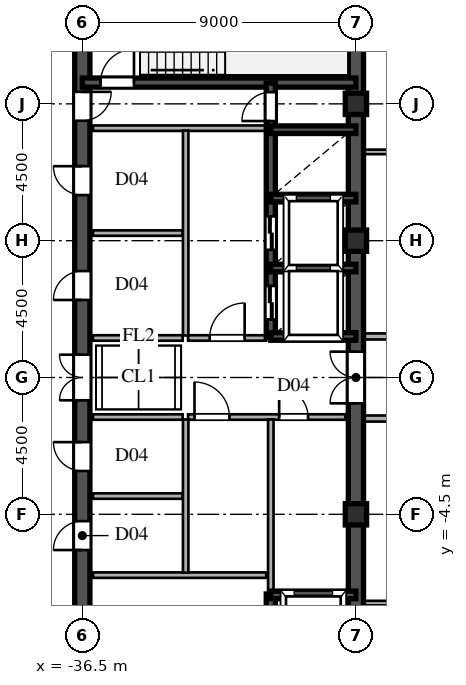
"""IFC4 building model, lengths in metres.
Left out: names, types, materials, properties, quantities, classifications, styles, units other than length and angle.
Written with IfcOpenShell. Run it as: python <this file> out.ifc"""

import sys

from ifc_helpers import new_model, si_unit, direction, frame, frame_2d, origin, origin_2d, place, context, subcontext, project, spatial, rectangle, hollow_rectangle, extrude, source, transform, mapped, element, fill, save


model = new_model("IFC4")
c1 = context("Model", 3, precision=1e-05, world=origin(), true_north=direction((0.0, 1.0)))
c2 = subcontext(c1, "Body", "Model", "MODEL_VIEW")
j1 = project(units=[si_unit("LENGTHUNIT", "METRE"), si_unit("PLANEANGLEUNIT", "RADIAN")], contexts=[c1])
p1 = place(None, origin())
s1 = spatial("IfcSite", under=j1, at=p1, CompositionType="ELEMENT")
p2 = place(p1, origin())
s2 = spatial("IfcBuilding", under=s1, at=p2, CompositionType="ELEMENT")
p3 = place(p2, frame((0.0, 0.0, 239.4)))
s3 = spatial("IfcBuildingStorey", under=s2, at=p3, CompositionType="ELEMENT", Elevation=239.4)
m1 = source(origin(), c2, "Body", "SweptSolid", [
    extrude(hollow_rectangle(XDim=0.7, YDim=0.7, WallThickness=0.03, at=origin_2d()), origin(), (0.0, 0.0, 1.0), 3.75),
])
for number, where, z_axis, x_axis in (
    (1, (-27.5, -4.5, 0.0), (0.0, 0.0, 1.0), (1.0, 0.0, 0.0)),
    (2, (-27.5, 4.5, 0.0), (0.0, 0.0, 1.0), (1.0, 0.0, 0.0)),
    (3, (-27.5, 9.0, 0.0), (0.0, 0.0, 1.0), (1.0, 0.0, 0.0)),
):
    element("IfcColumn", number, at=place(p3, frame(where, z_axis=z_axis, x_axis=x_axis)), inside=s3, PredefinedType="COLUMN", context=c2, shape_type="MappedRepresentation", body=[
        mapped(m1, transform((0.0, 0.0, 0.0), scale=1.0)),
    ])
for number, where, z_axis, x_axis in (
    (4, (-27.5, -13.5, 0.0), (0.0, 0.0, 1.0), (0.0, 1.0, 0.0)),
    (5, (-27.5, 1.3, 0.0), (0.0, 0.0, 1.0), (0.0, 1.0, 0.0)),
):
    element("IfcWall", number, at=place(p3, frame(where, z_axis=z_axis, x_axis=x_axis)), inside=s3, PredefinedType="SHEAR", context=c2, shape_type="SweptSolid", body=[
        extrude(rectangle(XDim=12.2, YDim=0.5, at=frame_2d((6.1, 0.0))), origin(), (0.0, 0.0, 1.0), 3.53),
    ])
p4 = place(p3, frame((-27.5, -1.3, 0.0), z_axis=(0.0, 0.0, 1.0), x_axis=(0.0, 1.0, 0.0)))
e6 = element("IfcWall", 6, at=p4, inside=s3, PredefinedType="SHEAR", context=c2, shape_type="SweptSolid", body=[
    extrude(rectangle(XDim=2.6, YDim=0.5, at=frame_2d((1.3, 0.0))), origin(), (0.0, 0.0, 1.0), 3.53),
])
p5 = place(p4, frame((0.45, 0.0, 0.0)))
e7 = element("IfcOpeningElement", 7, at=p5, cuts=e6, PredefinedType="OPENING", context=c2, shape_type="SweptSolid", body=[
    extrude(rectangle(XDim=1.7, YDim=2.35, at=frame_2d((0.85, 1.175))), frame((0.0, 0.26, 0.0), z_axis=(0.0, -1.0, 0.0), x_axis=(1.0, 0.0, 0.0)), (0.0, 0.0, 1.0), 0.52),
])
p6 = place(p3, frame((-36.5, -13.65, 0.0), z_axis=(0.0, 0.0, 1.0), x_axis=(0.0, 1.0, 0.0)))
e8 = element("IfcWall", 8, at=p6, inside=s3, PredefinedType="SHEAR", context=c2, shape_type="SweptSolid", body=[
    extrude(rectangle(XDim=7.15, YDim=0.5, at=frame_2d((3.575, 0.0))), origin(), (0.0, 0.0, 1.0), 3.53),
])
p7 = place(p6, frame((4.675, 0.0, 0.0)))
e9 = element("IfcOpeningElement", 9, at=p7, cuts=e8, PredefinedType="OPENING", context=c2, shape_type="SweptSolid", body=[
    extrude(rectangle(XDim=1.15, YDim=2.2, at=frame_2d((0.575, 1.1))), frame((0.0, 0.26, 0.0), z_axis=(0.0, -1.0, 0.0), x_axis=(1.0, 0.0, 0.0)), (0.0, 0.0, 1.0), 0.52),
])
p8 = place(p3, frame((-36.5, -1.3, 0.0), z_axis=(0.0, 0.0, 1.0), x_axis=(0.0, 1.0, 0.0)))
e10 = element("IfcWall", 10, at=p8, inside=s3, PredefinedType="SHEAR", context=c2, shape_type="SweptSolid", body=[
    extrude(rectangle(XDim=2.6, YDim=0.5, at=frame_2d((1.3, 0.0))), origin(), (0.0, 0.0, 1.0), 3.53),
])
p9 = place(p8, frame((0.55, 0.0, 0.0)))
e11 = element("IfcOpeningElement", 11, at=p9, cuts=e10, PredefinedType="OPENING", context=c2, shape_type="SweptSolid", body=[
    extrude(rectangle(XDim=1.5, YDim=2.3, at=frame_2d((0.75, 1.15))), frame((0.0, 0.26, 0.0), z_axis=(0.0, -1.0, 0.0), x_axis=(1.0, 0.0, 0.0)), (0.0, 0.0, 1.0), 0.52),
])
p10 = place(p3, frame((-36.5, 8.2, 0.0), z_axis=(0.0, 0.0, 1.0), x_axis=(0.0, 1.0, 0.0)))
e12 = element("IfcWall", 12, at=p10, inside=s3, PredefinedType="SHEAR", context=c2, shape_type="SweptSolid", body=[
    extrude(rectangle(XDim=5.45, YDim=0.5, at=frame_2d((2.725, 0.0))), origin(), (0.0, 0.0, 1.0), 3.53),
])
p11 = place(p10, frame((0.245, 0.0, 0.0)))
e13 = element("IfcOpeningElement", 13, at=p11, cuts=e12, PredefinedType="OPENING", context=c2, shape_type="SweptSolid", body=[
    extrude(rectangle(XDim=0.95, YDim=2.15, at=frame_2d((0.475, 1.075))), frame((0.0, 0.26, 0.0), z_axis=(0.0, -1.0, 0.0), x_axis=(1.0, 0.0, 0.0)), (0.0, 0.0, 1.0), 0.52),
])
p12 = place(p3, frame((-36.5, -6.5, 0.0), z_axis=(0.0, 0.0, 1.0), x_axis=(0.0, 1.0, 0.0)))
e14 = element("IfcWall", 14, at=p12, inside=s3, PredefinedType="SHEAR", context=c2, shape_type="SweptSolid", body=[
    extrude(rectangle(XDim=2.6, YDim=0.5, at=frame_2d((1.3, 0.0))), origin(), (0.0, 0.0, 1.0), 3.53),
])
p13 = place(p12, frame((0.825, 0.0, 0.0)))
e15 = element("IfcOpeningElement", 15, at=p13, cuts=e14, PredefinedType="OPENING", context=c2, shape_type="SweptSolid", body=[
    extrude(rectangle(XDim=0.95, YDim=2.15, at=frame_2d((0.475, 1.075))), frame((0.0, 0.26, 0.0), z_axis=(0.0, -1.0, 0.0), x_axis=(1.0, 0.0, 0.0)), (0.0, 0.0, 1.0), 0.52),
])
p14 = place(p3, frame((-36.5, -3.9, 0.0), z_axis=(0.0, 0.0, 1.0), x_axis=(0.0, 1.0, 0.0)))
e16 = element("IfcWall", 16, at=p14, inside=s3, PredefinedType="SHEAR", context=c2, shape_type="SweptSolid", body=[
    extrude(rectangle(XDim=2.6, YDim=0.5, at=frame_2d((1.3, 0.0))), origin(), (0.0, 0.0, 1.0), 3.53),
])
p15 = place(p14, frame((0.825, 0.0, 0.0)))
e17 = element("IfcOpeningElement", 17, at=p15, cuts=e16, PredefinedType="OPENING", context=c2, shape_type="SweptSolid", body=[
    extrude(rectangle(XDim=0.95, YDim=2.15, at=frame_2d((0.475, 1.075))), frame((0.0, 0.26, 0.0), z_axis=(0.0, -1.0, 0.0), x_axis=(1.0, 0.0, 0.0)), (0.0, 0.0, 1.0), 0.52),
])
p16 = place(p3, frame((-36.5, 1.3, 0.0), z_axis=(0.0, 0.0, 1.0), x_axis=(0.0, 1.0, 0.0)))
e18 = element("IfcWall", 18, at=p16, inside=s3, PredefinedType="SHEAR", context=c2, shape_type="SweptSolid", body=[
    extrude(rectangle(XDim=3.45, YDim=0.5, at=frame_2d((1.725, 0.0))), origin(), (0.0, 0.0, 1.0), 3.53),
])
p17 = place(p16, frame((1.25, 0.0, 0.0)))
e19 = element("IfcOpeningElement", 19, at=p17, cuts=e18, PredefinedType="OPENING", context=c2, shape_type="SweptSolid", body=[
    extrude(rectangle(XDim=0.95, YDim=2.15, at=frame_2d((0.475, 1.075))), frame((0.0, 0.26, 0.0), z_axis=(0.0, -1.0, 0.0), x_axis=(1.0, 0.0, 0.0)), (0.0, 0.0, 1.0), 0.52),
])
p18 = place(p3, frame((-36.5, 4.75, 0.0), z_axis=(0.0, 0.0, 1.0), x_axis=(0.0, 1.0, 0.0)))
e20 = element("IfcWall", 20, at=p18, inside=s3, PredefinedType="SHEAR", context=c2, shape_type="SweptSolid", body=[
    extrude(rectangle(XDim=3.45, YDim=0.5, at=frame_2d((1.725, 0.0))), origin(), (0.0, 0.0, 1.0), 3.53),
])
p19 = place(p18, frame((1.25, 0.0, 0.0)))
e21 = element("IfcOpeningElement", 21, at=p19, cuts=e20, PredefinedType="OPENING", context=c2, shape_type="SweptSolid", body=[
    extrude(rectangle(XDim=0.95, YDim=2.15, at=frame_2d((0.475, 1.075))), frame((0.0, 0.26, 0.0), z_axis=(0.0, -1.0, 0.0), x_axis=(1.0, 0.0, 0.0)), (0.0, 0.0, 1.0), 0.52),
])
p20 = place(p3, frame((-36.5, 9.7, 0.0), z_axis=(0.0, 0.0, 1.0), x_axis=(1.0, 0.0, 0.0)))
e22 = element("IfcWall", 22, at=p20, inside=s3, PredefinedType="SHEAR", context=c2, shape_type="SweptSolid", body=[
    extrude(rectangle(XDim=9.0, YDim=0.3, at=frame_2d((4.5, 0.0))), origin(), (0.0, 0.0, 1.0), 3.53),
])
p21 = place(p20, frame((0.6, 0.0, 0.0)))
e23 = element("IfcOpeningElement", 23, at=p21, cuts=e22, PredefinedType="OPENING", context=c2, shape_type="SweptSolid", body=[
    extrude(rectangle(XDim=1.1, YDim=2.2, at=frame_2d((0.55, 1.1))), frame((0.0, 0.16, 0.0), z_axis=(0.0, -1.0, 0.0), x_axis=(1.0, 0.0, 0.0)), (0.0, 0.0, 1.0), 0.32),
])
for number, where, z_axis, x_axis in (
    (24, (-30.3, -7.15, 0.0), (0.0, 0.0, 1.0), (1.0, 0.0, 0.0)),
    (25, (-30.3, 1.35, 0.0), (0.0, 0.0, 1.0), (1.0, 0.0, 0.0)),
    (26, (-30.3, 3.6, 0.0), (0.0, 0.0, 1.0), (1.0, 0.0, 0.0)),
    (27, (-30.3, 5.9, 0.0), (0.0, 0.0, 1.0), (1.0, 0.0, 0.0)),
    (28, (-30.3, 8.15, 0.0), (0.0, 0.0, 1.0), (1.0, 0.0, 0.0)),
):
    element("IfcWall", number, at=place(p3, frame(where, z_axis=z_axis, x_axis=x_axis)), inside=s3, PredefinedType="SHEAR", context=c2, shape_type="SweptSolid", body=[
        extrude(rectangle(XDim=2.8, YDim=0.25, at=frame_2d((1.4, 0.0))), origin(), (0.0, 0.0, 1.0), 3.53),
    ])
p22 = place(p3, frame((-30.3, -9.68, 0.0), z_axis=(0.0, 0.0, 1.0), x_axis=(0.0, 1.0, 0.0)))
e29 = element("IfcWall", 29, at=p22, inside=s3, PredefinedType="SHEAR", context=c2, shape_type="SweptSolid", body=[
    extrude(rectangle(XDim=2.56, YDim=0.3, at=frame_2d((1.28, 0.0))), origin(), (0.0, 0.0, 1.0), 3.53),
])
p23 = place(p22, frame((0.68, 0.0, 0.0)))
e30 = element("IfcOpeningElement", 30, at=p23, cuts=e29, PredefinedType="OPENING", context=c2, shape_type="SweptSolid", body=[
    extrude(rectangle(XDim=1.2, YDim=2.25, at=frame_2d((0.6, 1.125))), frame((0.0, 0.16, 0.0), z_axis=(0.0, -1.0, 0.0), x_axis=(1.0, 0.0, 0.0)), (0.0, 0.0, 1.0), 0.32),
])
p24 = place(p3, frame((-30.3, 1.32, 0.0), z_axis=(0.0, 0.0, 1.0), x_axis=(0.0, 1.0, 0.0)))
e31 = element("IfcWall", 31, at=p24, inside=s3, PredefinedType="SHEAR", context=c2, shape_type="SweptSolid", body=[
    extrude(rectangle(XDim=2.28, YDim=0.3, at=frame_2d((1.14, 0.0))), origin(), (0.0, 0.0, 1.0), 3.53),
])
p25 = place(p24, frame((0.59, 0.0, 0.0)))
e32 = element("IfcOpeningElement", 32, at=p25, cuts=e31, PredefinedType="OPENING", context=c2, shape_type="SweptSolid", body=[
    extrude(rectangle(XDim=1.1, YDim=2.2, at=frame_2d((0.55, 1.1))), frame((0.0, 0.16, 0.0), z_axis=(0.0, -1.0, 0.0), x_axis=(1.0, 0.0, 0.0)), (0.0, 0.0, 1.0), 0.32),
])
p26 = place(p3, frame((-30.3, 3.6, 0.0), z_axis=(0.0, 0.0, 1.0), x_axis=(0.0, 1.0, 0.0)))
e33 = element("IfcWall", 33, at=p26, inside=s3, PredefinedType="SHEAR", context=c2, shape_type="SweptSolid", body=[
    extrude(rectangle(XDim=2.3, YDim=0.3, at=frame_2d((1.15, 0.0))), origin(), (0.0, 0.0, 1.0), 3.53),
])
p27 = place(p26, frame((0.6, 0.0, 0.0)))
e34 = element("IfcOpeningElement", 34, at=p27, cuts=e33, PredefinedType="OPENING", context=c2, shape_type="SweptSolid", body=[
    extrude(rectangle(XDim=1.1, YDim=2.2, at=frame_2d((0.55, 1.1))), frame((0.0, 0.16, 0.0), z_axis=(0.0, -1.0, 0.0), x_axis=(1.0, 0.0, 0.0)), (0.0, 0.0, 1.0), 0.32),
])
p28 = place(p3, frame((-30.3, 5.9, 0.0), z_axis=(0.0, 0.0, 1.0), x_axis=(0.0, 1.0, 0.0)))
e35 = element("IfcWall", 35, at=p28, inside=s3, PredefinedType="SHEAR", context=c2, shape_type="SweptSolid", body=[
    extrude(rectangle(XDim=2.25, YDim=0.3, at=frame_2d((1.125, 0.0))), origin(), (0.0, 0.0, 1.0), 3.53),
])
p29 = place(p3, frame((-30.3, 8.15, 0.0), z_axis=(0.0, 0.0, 1.0), x_axis=(0.0, 1.0, 0.0)))
e36 = element("IfcWall", 36, at=p29, inside=s3, PredefinedType="SHEAR", context=c2, shape_type="SweptSolid", body=[
    extrude(rectangle(XDim=1.53, YDim=0.3, at=frame_2d((0.765, 0.0))), origin(), (0.0, 0.0, 1.0), 3.53),
])
p30 = place(p29, frame((0.285, 0.0, 0.0)))
e37 = element("IfcOpeningElement", 37, at=p30, cuts=e36, PredefinedType="OPENING", context=c2, shape_type="SweptSolid", body=[
    extrude(rectangle(XDim=0.95, YDim=2.15, at=frame_2d((0.475, 1.075))), frame((0.0, 0.16, 0.0), z_axis=(0.0, -1.0, 0.0), x_axis=(1.0, 0.0, 0.0)), (0.0, 0.0, 1.0), 0.32),
])
for number, where, z_axis, x_axis in (
    (38, (-36.15, -6.5, 0.0), (0.0, 0.0, 1.0), (1.0, 0.0, 0.0)),
    (39, (-36.15, 8.2, 0.0), (0.0, 0.0, 1.0), (1.0, 0.0, 0.0)),
):
    element("IfcWall", number, at=place(p3, frame(where, z_axis=z_axis, x_axis=x_axis)), inside=s3, PredefinedType="PARTITIONING", context=c2, shape_type="SweptSolid", body=[
        extrude(rectangle(XDim=5.7, YDim=0.18, at=frame_2d((2.85, 0.0))), origin(), (0.0, 0.0, 1.0), 3.53),
    ])
p31 = place(p3, frame((-33.1, -6.42, 0.0), z_axis=(0.0, 0.0, 1.0), x_axis=(0.0, 1.0, 0.0)))
e40 = element("IfcWall", 40, at=p31, inside=s3, PredefinedType="PARTITIONING", context=c2, shape_type="SweptSolid", body=[
    extrude(rectangle(XDim=5.04, YDim=0.18, at=frame_2d((2.52, 0.0))), origin(), (0.0, 0.0, 1.0), 3.53),
])
p32 = place(p3, frame((-33.1, 1.38, 0.0), z_axis=(0.0, 0.0, 1.0), x_axis=(0.0, 1.0, 0.0)))
e41 = element("IfcWall", 41, at=p32, inside=s3, PredefinedType="PARTITIONING", context=c2, shape_type="SweptSolid", body=[
    extrude(rectangle(XDim=6.74, YDim=0.18, at=frame_2d((3.37, 0.0))), origin(), (0.0, 0.0, 1.0), 3.53),
])
p33 = place(p3, frame((-30.3, -1.3, 0.0), z_axis=(0.0, 0.0, 1.0), x_axis=(1.0, 0.0, 0.0)))
e42 = element("IfcWall", 42, at=p33, inside=s3, PredefinedType="PARTITIONING", context=c2, shape_type="SweptSolid", body=[
    extrude(rectangle(XDim=2.45, YDim=0.18, at=frame_2d((1.225, 0.0))), origin(), (0.0, 0.0, 1.0), 3.53),
])
p34 = place(p33, frame((0.275, 0.0, 0.0)))
e43 = element("IfcOpeningElement", 43, at=p34, cuts=e42, PredefinedType="OPENING", context=c2, shape_type="SweptSolid", body=[
    extrude(rectangle(XDim=0.95, YDim=2.15, at=frame_2d((0.475, 1.075))), frame((0.0, 0.1, 0.0), z_axis=(0.0, -1.0, 0.0), x_axis=(1.0, 0.0, 0.0)), (0.0, 0.0, 1.0), 0.2),
])
p35 = place(p3, frame((-33.02, -1.3, 0.0), z_axis=(0.0, 0.0, 1.0), x_axis=(1.0, 0.0, 0.0)))
e44 = element("IfcWall", 44, at=p35, inside=s3, PredefinedType="PARTITIONING", context=c2, shape_type="SweptSolid", body=[
    extrude(rectangle(XDim=2.72, YDim=0.18, at=frame_2d((1.36, 0.0))), origin(), (0.0, 0.0, 1.0), 3.53),
])
p36 = place(p35, frame((0.21, 0.0, 0.0)))
e45 = element("IfcOpeningElement", 45, at=p36, cuts=e44, PredefinedType="OPENING", context=c2, shape_type="SweptSolid", body=[
    extrude(rectangle(XDim=1.15, YDim=2.2, at=frame_2d((0.575, 1.1))), frame((0.0, 0.1, 0.0), z_axis=(0.0, -1.0, 0.0), x_axis=(1.0, 0.0, 0.0)), (0.0, 0.0, 1.0), 0.2),
])
p37 = place(p3, frame((-30.3, -7.12, 0.0), z_axis=(0.0, 0.0, 1.0), x_axis=(0.0, 1.0, 0.0)))
e46 = element("IfcWall", 46, at=p37, inside=s3, PredefinedType="PARTITIONING", context=c2, shape_type="SweptSolid", body=[
    extrude(rectangle(XDim=5.74, YDim=0.18, at=frame_2d((2.87, 0.0))), origin(), (0.0, 0.0, 1.0), 3.53),
])
p38 = place(p3, frame((-33.02, 1.3, 0.0), z_axis=(0.0, 0.0, 1.0), x_axis=(1.0, 0.0, 0.0)))
e47 = element("IfcWall", 47, at=p38, inside=s3, PredefinedType="PARTITIONING", context=c2, shape_type="SweptSolid", body=[
    extrude(rectangle(XDim=2.57, YDim=0.18, at=frame_2d((1.285, 0.0))), origin(), (0.0, 0.0, 1.0), 3.53),
])
p39 = place(p38, frame((0.71, 0.0, 0.0)))
e48 = element("IfcOpeningElement", 48, at=p39, cuts=e47, PredefinedType="OPENING", context=c2, shape_type="SweptSolid", body=[
    extrude(rectangle(XDim=1.15, YDim=2.2, at=frame_2d((0.575, 1.1))), frame((0.0, 0.1, 0.0), z_axis=(0.0, -1.0, 0.0), x_axis=(1.0, 0.0, 0.0)), (0.0, 0.0, 1.0), 0.2),
])
for number, where, z_axis, x_axis in (
    (49, (-36.15, -1.3, 0.0), (0.0, 0.0, 1.0), (1.0, 0.0, 0.0)),
    (50, (-36.15, 1.3, 0.0), (0.0, 0.0, 1.0), (1.0, 0.0, 0.0)),
    (51, (-36.15, -3.9, 0.0), (0.0, 0.0, 1.0), (1.0, 0.0, 0.0)),
    (52, (-36.15, 4.75, 0.0), (0.0, 0.0, 1.0), (1.0, 0.0, 0.0)),
):
    element("IfcWall", number, at=place(p3, frame(where, z_axis=z_axis, x_axis=x_axis)), inside=s3, PredefinedType="PARTITIONING", context=c2, shape_type="SweptSolid", body=[
        extrude(rectangle(XDim=2.95, YDim=0.18, at=frame_2d((1.475, 0.0))), origin(), (0.0, 0.0, 1.0), 3.53),
    ])
p40 = place(p3, frame((-27.245, -7.42, 0.0), z_axis=(0.0, 0.0, 1.0), x_axis=(1.0, 0.0, 0.0)))
e53 = element("IfcWall", 53, at=p40, inside=s3, PredefinedType="PARTITIONING", context=c2, shape_type="SweptSolid", body=[
    extrude(rectangle(XDim=6.66, YDim=0.15, at=frame_2d((3.33, 0.0))), origin(), (0.0, 0.0, 1.0), 3.53),
])
p41 = place(p40, frame((3.07, 0.0, 0.0)))
e54 = element("IfcOpeningElement", 54, at=p41, cuts=e53, PredefinedType="OPENING", context=c2, shape_type="SweptSolid", body=[
    extrude(rectangle(XDim=0.95, YDim=2.15, at=frame_2d((0.475, 1.075))), frame((0.0, 0.085, 0.0), z_axis=(0.0, -1.0, 0.0), x_axis=(1.0, 0.0, 0.0)), (0.0, 0.0, 1.0), 0.17),
])
p42 = place(p3, frame((-27.245, -1.35, 0.0), z_axis=(0.0, 0.0, 1.0), x_axis=(1.0, 0.0, 0.0)))
e55 = element("IfcWall", 55, at=p42, inside=s3, PredefinedType="PARTITIONING", context=c2, shape_type="SweptSolid", body=[
    extrude(rectangle(XDim=54.49, YDim=0.2, at=frame_2d((27.245, 0.0))), origin(), (0.0, 0.0, 1.0), 3.53),
])
p43 = place(p42, frame((23.47, 0.0, 0.0)))
e56 = element("IfcOpeningElement", 56, at=p43, cuts=e55, PredefinedType="OPENING", context=c2, shape_type="SweptSolid", body=[
    extrude(rectangle(XDim=1.05, YDim=2.25, at=frame_2d((0.525, 1.125))), frame((0.0, 0.11, 0.0), z_axis=(0.0, -1.0, 0.0), x_axis=(1.0, 0.0, 0.0)), (0.0, 0.0, 1.0), 0.22),
])
p44 = place(p3, frame((-27.245, 1.35, 0.0), z_axis=(0.0, 0.0, 1.0), x_axis=(1.0, 0.0, 0.0)))
e57 = element("IfcWall", 57, at=p44, inside=s3, PredefinedType="PARTITIONING", context=c2, shape_type="SweptSolid", body=[
    extrude(rectangle(XDim=54.49, YDim=0.2, at=frame_2d((27.245, 0.0))), origin(), (0.0, 0.0, 1.0), 3.53),
])
p45 = place(p44, frame((23.47, 0.0, 0.0)))
e58 = element("IfcOpeningElement", 58, at=p45, cuts=e57, PredefinedType="OPENING", context=c2, shape_type="SweptSolid", body=[
    extrude(rectangle(XDim=1.05, YDim=2.25, at=frame_2d((0.525, 1.125))), frame((0.0, 0.11, 0.0), z_axis=(0.0, -1.0, 0.0), x_axis=(1.0, 0.0, 0.0)), (0.0, 0.0, 1.0), 0.22),
])
p46 = place(p3, frame((-27.245, 7.42, 0.0), z_axis=(0.0, 0.0, 1.0), x_axis=(1.0, 0.0, 0.0)))
e59 = element("IfcWall", 59, at=p46, inside=s3, PredefinedType="PARTITIONING", context=c2, shape_type="SweptSolid", body=[
    extrude(rectangle(XDim=6.66, YDim=0.15, at=frame_2d((3.33, 0.0))), origin(), (0.0, 0.0, 1.0), 3.53),
])
p47 = place(p46, frame((3.07, 0.0, 0.0)))
e60 = element("IfcOpeningElement", 60, at=p47, cuts=e59, PredefinedType="OPENING", context=c2, shape_type="SweptSolid", body=[
    extrude(rectangle(XDim=0.95, YDim=2.15, at=frame_2d((0.475, 1.075))), frame((0.0, 0.085, 0.0), z_axis=(0.0, -1.0, 0.0), x_axis=(1.0, 0.0, 0.0)), (0.0, 0.0, 1.0), 0.17),
])
m2 = source(origin(), c2, "Body", "SweptSolid", [
    extrude(rectangle(XDim=1.7, YDim=2.35, at=frame_2d((0.85, 1.175))), frame((0.0, 0.025, 0.0), z_axis=(0.0, -1.0, 0.0), x_axis=(1.0, 0.0, 0.0)), (0.0, 0.0, 1.0), 0.05),
])
p48 = place(p5, origin())
e61 = element("IfcDoor", 61, at=p48, inside=s3, OperationType="DOUBLE_SWING_LEFT", PredefinedType="DOOR", context=c2, shape_type="MappedRepresentation", body=[
    mapped(m2, transform((0.0, 0.0, 0.0), scale=1.0)),
])
fill(e7, e61)
m3 = source(origin(), c2, "Body", "SweptSolid", [
    extrude(rectangle(XDim=1.5, YDim=2.3, at=frame_2d((0.75, 1.15))), frame((0.0, 0.025, 0.0), z_axis=(0.0, -1.0, 0.0), x_axis=(1.0, 0.0, 0.0)), (0.0, 0.0, 1.0), 0.05),
])
p49 = place(p9, origin())
e62 = element("IfcDoor", 62, at=p49, inside=s3, OperationType="DOUBLE_SWING_LEFT", PredefinedType="DOOR", context=c2, shape_type="MappedRepresentation", body=[
    mapped(m3, transform((0.0, 0.0, 0.0), scale=1.0)),
])
fill(e11, e62)
m4 = source(origin(), c2, "Body", "SweptSolid", [
    extrude(rectangle(XDim=0.95, YDim=2.15, at=frame_2d((0.475, 1.075))), frame((0.0, 0.025, 0.0), z_axis=(0.0, -1.0, 0.0), x_axis=(1.0, 0.0, 0.0)), (0.0, 0.0, 1.0), 0.05),
])
p50 = place(p11, frame((0.95, 0.0, 0.0), z_axis=(0.0, 0.0, 1.0), x_axis=(-1.0, 0.0, 0.0)))
e63 = element("IfcDoor", 63, at=p50, inside=s3, OperationType="SINGLE_SWING_RIGHT", PredefinedType="DOOR", context=c2, shape_type="MappedRepresentation", body=[
    mapped(m4, transform((0.0, 0.0, 0.0), scale=1.0)),
])
fill(e13, e63)
p51 = place(p13, origin())
e64 = element("IfcDoor", 64, at=p51, inside=s3, OperationType="SINGLE_SWING_LEFT", PredefinedType="DOOR", context=c2, shape_type="MappedRepresentation", body=[
    mapped(m4, transform((0.0, 0.0, 0.0), scale=1.0)),
])
fill(e15, e64)
p52 = place(p15, origin())
e65 = element("IfcDoor", 65, at=p52, inside=s3, OperationType="SINGLE_SWING_RIGHT", PredefinedType="DOOR", context=c2, shape_type="MappedRepresentation", body=[
    mapped(m4, transform((0.0, 0.0, 0.0), scale=1.0)),
])
fill(e17, e65)
p53 = place(p17, origin())
e66 = element("IfcDoor", 66, at=p53, inside=s3, OperationType="SINGLE_SWING_LEFT", PredefinedType="DOOR", context=c2, shape_type="MappedRepresentation", body=[
    mapped(m4, transform((0.0, 0.0, 0.0), scale=1.0)),
])
fill(e19, e66)
p54 = place(p19, origin())
e67 = element("IfcDoor", 67, at=p54, inside=s3, OperationType="SINGLE_SWING_RIGHT", PredefinedType="DOOR", context=c2, shape_type="MappedRepresentation", body=[
    mapped(m4, transform((0.0, 0.0, 0.0), scale=1.0)),
])
fill(e21, e67)
m5 = source(origin(), c2, "Body", "SweptSolid", [
    extrude(rectangle(XDim=1.1, YDim=2.2, at=frame_2d((0.55, 1.1))), frame((0.0, 0.025, 0.0), z_axis=(0.0, -1.0, 0.0), x_axis=(1.0, 0.0, 0.0)), (0.0, 0.0, 1.0), 0.05),
])
p55 = place(p21, origin())
e68 = element("IfcDoor", 68, at=p55, inside=s3, OperationType="SINGLE_SWING_RIGHT", PredefinedType="DOOR", context=c2, shape_type="MappedRepresentation", body=[
    mapped(m5, transform((0.0, 0.0, 0.0), scale=1.0)),
])
fill(e23, e68)
m6 = source(origin(), c2, "Body", "SweptSolid", [
    extrude(rectangle(XDim=1.1, YDim=2.2, at=frame_2d((0.55, 1.1))), frame((0.0, 0.025, 0.0), z_axis=(0.0, -1.0, 0.0), x_axis=(1.0, 0.0, 0.0)), (0.0, 0.0, 1.0), 0.05),
])
p56 = place(p25, origin())
e69 = element("IfcDoor", 69, at=p56, inside=s3, OperationType="DOUBLE_DOOR_SLIDING", PredefinedType="DOOR", context=c2, shape_type="MappedRepresentation", body=[
    mapped(m6, transform((0.0, 0.0, 0.0), scale=1.0)),
])
fill(e32, e69)
p57 = place(p27, origin())
e70 = element("IfcDoor", 70, at=p57, inside=s3, OperationType="DOUBLE_DOOR_SLIDING", PredefinedType="DOOR", context=c2, shape_type="MappedRepresentation", body=[
    mapped(m6, transform((0.0, 0.0, 0.0), scale=1.0)),
])
fill(e34, e70)
p58 = place(p30, origin())
e71 = element("IfcDoor", 71, at=p58, inside=s3, OperationType="SINGLE_SWING_LEFT", PredefinedType="DOOR", context=c2, shape_type="MappedRepresentation", body=[
    mapped(m4, transform((0.0, 0.0, 0.0), scale=1.0)),
])
fill(e37, e71)
p59 = place(p34, origin())
e72 = element("IfcDoor", 72, at=p59, inside=s3, OperationType="SINGLE_SWING_LEFT", PredefinedType="DOOR", context=c2, shape_type="MappedRepresentation", body=[
    mapped(m4, transform((0.0, 0.0, 0.0), scale=1.0)),
])
fill(e43, e72)
m7 = source(origin(), c2, "Body", "SweptSolid", [
    extrude(rectangle(XDim=1.15, YDim=2.2, at=frame_2d((0.575, 1.1))), frame((0.0, 0.025, 0.0), z_axis=(0.0, -1.0, 0.0), x_axis=(1.0, 0.0, 0.0)), (0.0, 0.0, 1.0), 0.05),
])
p60 = place(p36, origin())
e73 = element("IfcDoor", 73, at=p60, inside=s3, OperationType="SINGLE_SWING_LEFT", PredefinedType="DOOR", context=c2, shape_type="MappedRepresentation", body=[
    mapped(m7, transform((0.0, 0.0, 0.0), scale=1.0)),
])
fill(e45, e73)
p61 = place(p39, origin())
e74 = element("IfcDoor", 74, at=p61, inside=s3, OperationType="SINGLE_SWING_RIGHT", PredefinedType="DOOR", context=c2, shape_type="MappedRepresentation", body=[
    mapped(m7, transform((0.0, 0.0, 0.0), scale=1.0)),
])
fill(e48, e74)
save(model, sys.argv[1])
